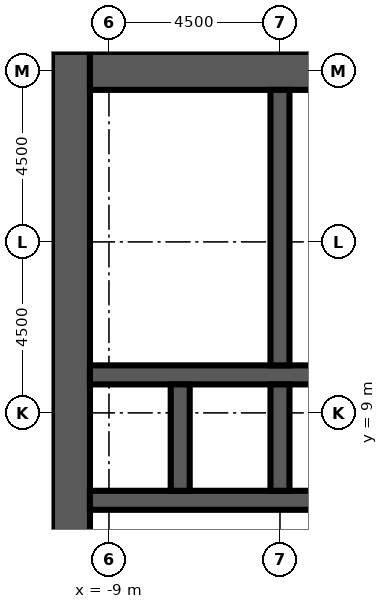
"""IFC4 building model, lengths in metres.
Left out: names, types, materials, properties, quantities, classifications, styles, units other than length and angle.
Written with IfcOpenShell. Run it as: python <this file> out.ifc"""

import sys

from ifc_helpers import new_model, si_unit, direction, frame, frame_2d, origin, place, context, subcontext, project, spatial, rectangle, extrude, element, fill, save


model = new_model("IFC4")
c1 = context("Model", 3, precision=1e-05, world=origin(), true_north=direction((0.0, 1.0)))
c2 = subcontext(c1, "Body", "Model", "MODEL_VIEW")
j1 = project(units=[si_unit("LENGTHUNIT", "METRE"), si_unit("PLANEANGLEUNIT", "RADIAN")], contexts=[c1])
p1 = place(None, origin())
s1 = spatial("IfcSite", under=j1, at=p1, CompositionType="ELEMENT")
p2 = place(p1, origin())
s2 = spatial("IfcBuilding", under=s1, at=p2, CompositionType="ELEMENT")
p3 = place(p2, frame((0.0, 0.0, 50.1)))
s3 = spatial("IfcBuildingStorey", under=s2, at=p3, CompositionType="ELEMENT", Elevation=50.1)
p4 = place(p3, frame((-10.0, -9.0, 0.0), z_axis=(0.0, 0.0, 1.0), x_axis=(0.0, 1.0, 0.0)))
e1 = element("IfcWall", 1, at=p4, inside=s3, PredefinedType="SHEAR", context=c2, shape_type="SweptSolid", body=[
    extrude(rectangle(XDim=27.5, YDim=1.0, at=frame_2d((13.75, 0.0))), origin(), (0.0, 0.0, 1.0), 4.1),
])
p5 = place(p4, frame((12.55, 0.0, 0.0)))
e2 = element("IfcOpeningElement", 2, at=p5, cuts=e1, PredefinedType="OPENING", context=c2, shape_type="SweptSolid", body=[
    extrude(rectangle(XDim=2.4, YDim=2.4, at=frame_2d((1.2, 1.2))), frame((0.0, 0.51, 0.0), z_axis=(0.0, -1.0, 0.0), x_axis=(1.0, 0.0, 0.0)), (0.0, 0.0, 1.0), 1.02),
])
p6 = place(p4, frame((6.825, 0.0, 0.0)))
e3 = element("IfcOpeningElement", 3, at=p6, cuts=e1, PredefinedType="OPENING", context=c2, shape_type="SweptSolid", body=[
    extrude(rectangle(XDim=1.2, YDim=2.1, at=frame_2d((0.6, 1.05))), frame((0.0, 0.51, 0.0), z_axis=(0.0, -1.0, 0.0), x_axis=(1.0, 0.0, 0.0)), (0.0, 0.0, 1.0), 1.02),
])
p7 = place(p4, frame((19.475, 0.0, 0.0)))
e4 = element("IfcOpeningElement", 4, at=p7, cuts=e1, PredefinedType="OPENING", context=c2, shape_type="SweptSolid", body=[
    extrude(rectangle(XDim=1.2, YDim=2.1, at=frame_2d((0.6, 1.05))), frame((0.0, 0.51, 0.0), z_axis=(0.0, -1.0, 0.0), x_axis=(1.0, 0.0, 0.0)), (0.0, 0.0, 1.0), 1.02),
])
p8 = place(p3, frame((-9.5, 18.0, 0.0), z_axis=(0.0, 0.0, 1.0), x_axis=(1.0, 0.0, 0.0)))
e5 = element("IfcWall", 5, at=p8, inside=s3, PredefinedType="SHEAR", context=c2, shape_type="SweptSolid", body=[
    extrude(rectangle(XDim=10.0, YDim=1.0, at=frame_2d((5.0, 0.0))), origin(), (0.0, 0.0, 1.0), 4.1),
])
p9 = place(p3, frame((-9.5, 6.7, 0.0), z_axis=(0.0, 0.0, 1.0), x_axis=(1.0, 0.0, 0.0)))
e6 = element("IfcWall", 6, at=p9, inside=s3, PredefinedType="SHEAR", context=c2, shape_type="SweptSolid", body=[
    extrude(rectangle(XDim=10.0, YDim=0.5, at=frame_2d((5.0, 0.0))), origin(), (0.0, 0.0, 1.0), 4.1),
])
p10 = place(p9, frame((0.512, 0.0, 0.0)))
e7 = element("IfcOpeningElement", 7, at=p10, cuts=e6, PredefinedType="OPENING", context=c2, shape_type="SweptSolid", body=[
    extrude(rectangle(XDim=1.1, YDim=2.1, at=frame_2d((0.55, 1.05))), frame((0.0, 0.26, 0.0), z_axis=(0.0, -1.0, 0.0), x_axis=(1.0, 0.0, 0.0)), (0.0, 0.0, 1.0), 0.52),
])
p11 = place(p9, frame((3.188, 0.0, 0.0)))
e8 = element("IfcOpeningElement", 8, at=p11, cuts=e6, PredefinedType="OPENING", context=c2, shape_type="SweptSolid", body=[
    extrude(rectangle(XDim=1.0, YDim=2.1, at=frame_2d((0.5, 1.05))), frame((0.0, 0.26, 0.0), z_axis=(0.0, -1.0, 0.0), x_axis=(1.0, 0.0, 0.0)), (0.0, 0.0, 1.0), 0.52),
])
p12 = place(p9, frame((5.812, 0.0, 0.0)))
e9 = element("IfcOpeningElement", 9, at=p12, cuts=e6, PredefinedType="OPENING", context=c2, shape_type="SweptSolid", body=[
    extrude(rectangle(XDim=1.0, YDim=2.1, at=frame_2d((0.5, 1.05))), frame((0.0, 0.26, 0.0), z_axis=(0.0, -1.0, 0.0), x_axis=(1.0, 0.0, 0.0)), (0.0, 0.0, 1.0), 0.52),
])
p13 = place(p9, frame((8.438, 0.0, 0.0)))
e10 = element("IfcOpeningElement", 10, at=p13, cuts=e6, PredefinedType="OPENING", context=c2, shape_type="SweptSolid", body=[
    extrude(rectangle(XDim=1.0, YDim=2.1, at=frame_2d((0.5, 1.05))), frame((0.0, 0.26, 0.0), z_axis=(0.0, -1.0, 0.0), x_axis=(1.0, 0.0, 0.0)), (0.0, 0.0, 1.0), 0.52),
])
p14 = place(p3, frame((-9.5, 10.0, 0.0), z_axis=(0.0, 0.0, 1.0), x_axis=(1.0, 0.0, 0.0)))
e11 = element("IfcWall", 11, at=p14, inside=s3, PredefinedType="SHEAR", context=c2, shape_type="SweptSolid", body=[
    extrude(rectangle(XDim=10.0, YDim=0.5, at=frame_2d((5.0, 0.0))), origin(), (0.0, 0.0, 1.0), 4.1),
])
for number, where, z_axis, x_axis in (
    (12, (-7.125, 6.95, 0.0), (0.0, 0.0, 1.0), (0.0, 1.0, 0.0)),
    (13, (-4.5, 6.95, 0.0), (0.0, 0.0, 1.0), (0.0, 1.0, 0.0)),
):
    element("IfcWall", number, at=place(p3, frame(where, z_axis=z_axis, x_axis=x_axis)), inside=s3, PredefinedType="SHEAR", context=c2, shape_type="SweptSolid", body=[
        extrude(rectangle(XDim=2.8, YDim=0.5, at=frame_2d((1.4, 0.0))), origin(), (0.0, 0.0, 1.0), 4.1),
    ])
p15 = place(p3, frame((-4.5, 10.25, 0.0), z_axis=(0.0, 0.0, 1.0), x_axis=(0.0, 1.0, 0.0)))
e14 = element("IfcWall", 14, at=p15, inside=s3, PredefinedType="SHEAR", context=c2, shape_type="SweptSolid", body=[
    extrude(rectangle(XDim=7.25, YDim=0.5, at=frame_2d((3.625, 0.0))), origin(), (0.0, 0.0, 1.0), 4.1),
])
for number, where, z_axis, x_axis in (
    (15, (-4.25, 12.425, 0.0), (0.0, 0.0, 1.0), (1.0, 0.0, 0.0)),
    (16, (-4.25, 14.745, 0.0), (0.0, 0.0, 1.0), (1.0, 0.0, 0.0)),
):
    element("IfcWall", number, at=place(p3, frame(where, z_axis=z_axis, x_axis=x_axis)), inside=s3, PredefinedType="PARTITIONING", context=c2, shape_type="SweptSolid", body=[
        extrude(rectangle(XDim=3.35, YDim=0.1, at=frame_2d((1.675, 0.0))), origin(), (0.0, 0.0, 1.0), 3.65),
    ])
p16 = place(p10, origin())
e17 = element("IfcDoor", 17, at=p16, inside=s3, OperationType="DOUBLE_DOOR_SLIDING", PredefinedType="DOOR", context=c2, shape_type="SweptSolid", body=[
    extrude(rectangle(XDim=1.1, YDim=2.1, at=frame_2d((0.55, 1.05))), frame((0.0, 0.025, 0.0), z_axis=(0.0, -1.0, 0.0), x_axis=(1.0, 0.0, 0.0)), (0.0, 0.0, 1.0), 0.05),
])
fill(e7, e17)
p17 = place(p7, origin())
e18 = element("IfcDoor", 18, at=p17, inside=s3, OperationType="SINGLE_SWING_LEFT", PredefinedType="DOOR", context=c2, shape_type="SweptSolid", body=[
    extrude(rectangle(XDim=1.2, YDim=2.1, at=frame_2d((0.6, 1.05))), frame((0.0, 0.025, 0.0), z_axis=(0.0, -1.0, 0.0), x_axis=(1.0, 0.0, 0.0)), (0.0, 0.0, 1.0), 0.05),
])
fill(e4, e18)
p18 = place(p11, origin())
e19 = element("IfcDoor", 19, at=p18, inside=s3, OperationType="SINGLE_SWING_RIGHT", PredefinedType="DOOR", context=c2, shape_type="SweptSolid", body=[
    extrude(rectangle(XDim=1.0, YDim=2.1, at=frame_2d((0.5, 1.05))), frame((0.0, 0.025, 0.0), z_axis=(0.0, -1.0, 0.0), x_axis=(1.0, 0.0, 0.0)), (0.0, 0.0, 1.0), 0.05),
])
fill(e8, e19)
save(model, sys.argv[1])
